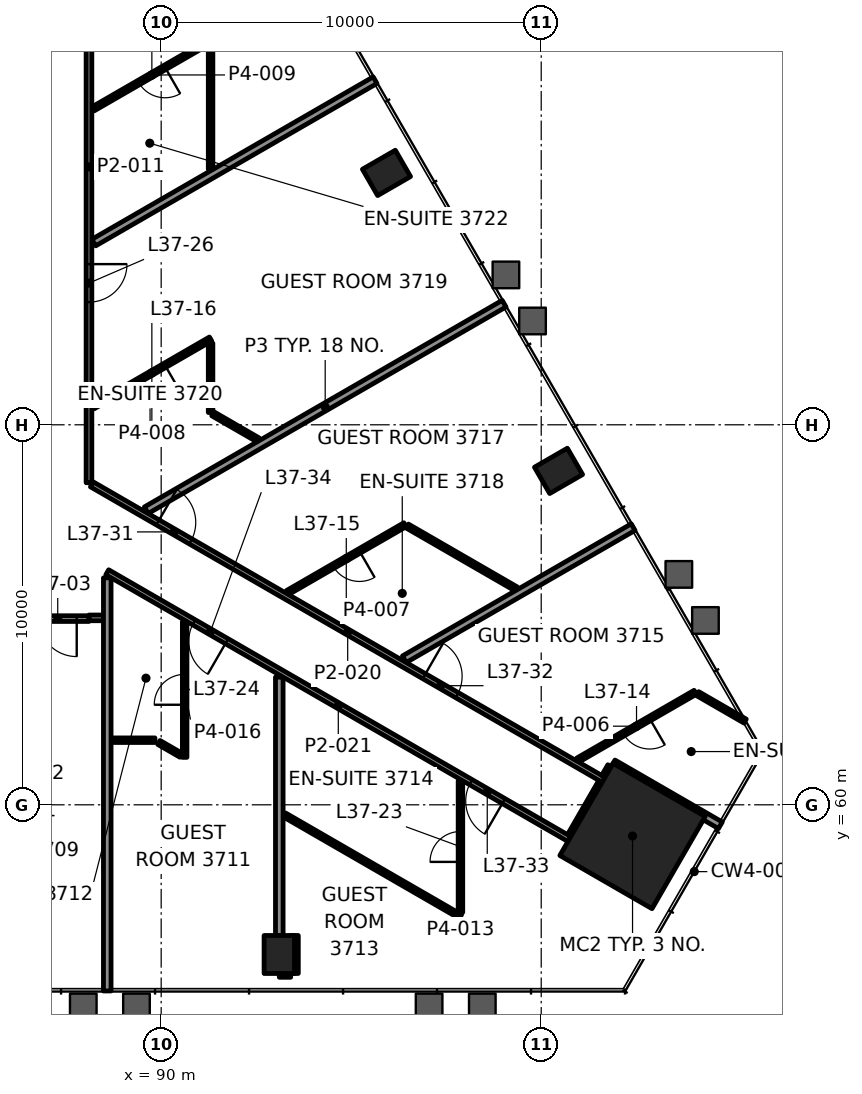
"""IFC4 building model, lengths in metres.
Left out: names, types, materials, properties, quantities, classifications, styles, units other than length and angle.
Written with IfcOpenShell. Run it as: python <this file> out.ifc"""

import sys

from ifc_helpers import new_model, si_unit, direction, frame, frame_2d, origin, origin_2d, place, context, subcontext, project, spatial, rectangle, hollow_rectangle, extrude, element, fill, save


model = new_model("IFC4")
c1 = context("Model", 3, precision=1e-05, world=origin(), true_north=direction((0.0, 1.0)))
c2 = subcontext(c1, "Body", "Model", "MODEL_VIEW")
j1 = project(units=[si_unit("LENGTHUNIT", "METRE"), si_unit("PLANEANGLEUNIT", "RADIAN")], contexts=[c1])
p1 = place(None, origin())
s1 = spatial("IfcSite", under=j1, at=p1, CompositionType="ELEMENT")
p2 = place(p1, origin())
s2 = spatial("IfcBuilding", under=s1, at=p2, CompositionType="ELEMENT")
p3 = place(p2, frame((0.0, 0.0, 163.6)))
s3 = spatial("IfcBuildingStorey", under=s2, at=p3, CompositionType="ELEMENT", Elevation=163.6)
p4 = place(p3, frame((102.403, 59.179, 0.0), z_axis=(0.0, 0.0, 1.0), x_axis=(0.5, 0.866025403784, 0.0)))
e1 = element("IfcColumn", 1, at=p4, inside=s3, PredefinedType="COLUMN", context=c2, shape_type="SweptSolid", body=[
    extrude(rectangle(XDim=2.8, YDim=2.8, at=origin_2d()), origin(), (0.0, 0.0, 1.0), 3.9),
])
for number, where, z_axis, x_axis in (
    (2, (93.108, 56.061, -0.0), (0.0, 0.0, 1.0), (1.0, 0.0, 0.0)),
    (3, (100.456, 68.788, -0.0), (0.0, 0.0, 1.0), (-0.5, 0.866, 0.0)),
    (4, (95.928, 76.628, -0.0), (0.0, 0.0, 1.0), (-0.5, 0.866, 0.0)),
):
    element("IfcColumn", number, at=place(p3, frame(where, z_axis=z_axis, x_axis=x_axis)), inside=s3, PredefinedType="COLUMN", context=c2, shape_type="SweptSolid", body=[
        extrude(hollow_rectangle(XDim=0.8, YDim=1.0, WallThickness=0.05, at=origin_2d()), origin(), (0.0, 0.0, 1.0), 3.9),
    ])
p5 = place(p3, frame((93.108, 55.561, 0.0), z_axis=(0.0, 0.0, 1.0), x_axis=(1.0, 0.0, 0.0)))
e5 = element("IfcWall", 5, at=p5, inside=s3, PredefinedType="PARTITIONING", context=c2, shape_type="SweptSolid", body=[
    extrude(rectangle(XDim=0.3, YDim=0.2, at=frame_2d((0.15, 0.0))), origin(), (0.0, 0.0, 1.0), 3.1),
])
p6 = place(p3, frame((88.691, 61.7, 0.0), z_axis=(0.0, 0.0, 1.0), x_axis=(1.0, 0.0, 0.0)))
e6 = element("IfcWall", 6, at=p6, inside=s3, PredefinedType="PARTITIONING", context=c2, shape_type="SweptSolid", body=[
    extrude(rectangle(XDim=1.145, YDim=0.12, at=frame_2d((0.573, 0.0))), origin(), (0.0, 0.0, 1.0), 3.1),
])
p7 = place(p3, frame((88.1, 64.9, 0.0), z_axis=(0.0, 0.0, 1.0), x_axis=(-1.0, 0.0, 0.0)))
e7 = element("IfcWall", 7, at=p7, inside=s3, PredefinedType="PARTITIONING", context=c2, shape_type="SweptSolid", body=[
    extrude(rectangle(XDim=26.199, YDim=0.15, at=frame_2d((13.1, 0.0))), origin(), (0.0, 0.0, 1.0), 3.1),
])
p8 = place(p7, frame((0.322, 0.0, 0.0)))
e8 = element("IfcOpeningElement", 8, at=p8, cuts=e7, PredefinedType="OPENING", context=c2, shape_type="SweptSolid", body=[
    extrude(rectangle(XDim=1.0, YDim=2.1, at=frame_2d((0.5, 1.05))), frame((0.0, 0.085, 0.0), z_axis=(0.0, -1.0, 0.0), x_axis=(1.0, 0.0, 0.0)), (0.0, 0.0, 1.0), 0.17),
])
p9 = place(p7, frame((5.859, 0.0, 0.0)))
e9 = element("IfcOpeningElement", 9, at=p9, cuts=e7, PredefinedType="OPENING", context=c2, shape_type="SweptSolid", body=[
    extrude(rectangle(XDim=0.9, YDim=2.1, at=frame_2d((0.45, 1.05))), frame((0.0, 0.085, 0.0), z_axis=(0.0, -1.0, 0.0), x_axis=(1.0, 0.0, 0.0)), (0.0, 0.0, 1.0), 0.17),
])
p10 = place(p7, frame((8.981, 0.0, 0.0)))
e10 = element("IfcOpeningElement", 10, at=p10, cuts=e7, PredefinedType="OPENING", context=c2, shape_type="SweptSolid", body=[
    extrude(rectangle(XDim=1.0, YDim=2.1, at=frame_2d((0.5, 1.05))), frame((0.0, 0.085, 0.0), z_axis=(0.0, -1.0, 0.0), x_axis=(1.0, 0.0, 0.0)), (0.0, 0.0, 1.0), 0.17),
])
p11 = place(p7, frame((16.611, 0.0, 0.0)))
e11 = element("IfcOpeningElement", 11, at=p11, cuts=e7, PredefinedType="OPENING", context=c2, shape_type="SweptSolid", body=[
    extrude(rectangle(XDim=0.9, YDim=2.1, at=frame_2d((0.45, 1.05))), frame((0.0, 0.085, 0.0), z_axis=(0.0, -1.0, 0.0), x_axis=(1.0, 0.0, 0.0)), (0.0, 0.0, 1.0), 0.17),
])
p12 = place(p7, frame((20.006, 0.0, 0.0)))
e12 = element("IfcOpeningElement", 12, at=p12, cuts=e7, PredefinedType="OPENING", context=c2, shape_type="SweptSolid", body=[
    extrude(rectangle(XDim=0.9, YDim=2.1, at=frame_2d((0.45, 1.05))), frame((0.0, 0.085, 0.0), z_axis=(0.0, -1.0, 0.0), x_axis=(1.0, 0.0, 0.0)), (0.0, 0.0, 1.0), 0.17),
])
p13 = place(p7, frame((23.575, 0.0, 0.0)))
e13 = element("IfcOpeningElement", 13, at=p13, cuts=e7, PredefinedType="OPENING", context=c2, shape_type="SweptSolid", body=[
    extrude(rectangle(XDim=1.0, YDim=2.1, at=frame_2d((0.5, 1.05))), frame((0.0, 0.085, 0.0), z_axis=(0.0, -1.0, 0.0), x_axis=(1.0, 0.0, 0.0)), (0.0, 0.0, 1.0), 0.17),
])
p14 = place(p3, frame((88.1, 64.919, 0.0), z_axis=(0.0, 0.0, 1.0), x_axis=(1.0, 0.0, 0.0)))
e14 = element("IfcWall", 14, at=p14, inside=s3, PredefinedType="PARTITIONING", context=c2, shape_type="SweptSolid", body=[
    extrude(rectangle(XDim=0.381, YDim=0.15, at=frame_2d((0.19, 0.0))), origin(), (0.0, 0.0, 1.0), 3.1),
])
p15 = place(p3, frame((104.053, 62.961, 0.0), z_axis=(0.0, 0.0, 1.0), x_axis=(-0.866045460162, -0.499965259726, 0.0)))
e15 = element("IfcWall", 15, at=p15, inside=s3, PredefinedType="PARTITIONING", context=c2, shape_type="SweptSolid", body=[
    extrude(rectangle(XDim=3.569, YDim=0.12, at=frame_2d((1.784, 0.0))), origin(), (0.0, 0.0, 1.0), 3.1),
])
p16 = place(p15, frame((1.384, 0.0, 0.0)))
e16 = element("IfcOpeningElement", 16, at=p16, cuts=e15, PredefinedType="OPENING", context=c2, shape_type="SweptSolid", body=[
    extrude(rectangle(XDim=0.8, YDim=2.1, at=frame_2d((0.4, 1.05))), frame((0.0, 0.07, 0.0), z_axis=(0.0, -1.0, 0.0), x_axis=(1.0, 0.0, 0.0)), (0.0, 0.0, 1.0), 0.14),
])
p17 = place(p3, frame((96.399, 63.831, 0.0), z_axis=(0.0, 0.0, 1.0), x_axis=(0.86602358327, 0.50000315321, 0.0)))
e17 = element("IfcWall", 17, at=p17, inside=s3, PredefinedType="PARTITIONING", context=c2, shape_type="SweptSolid", body=[
    extrude(rectangle(XDim=6.952, YDim=0.2, at=frame_2d((3.476, 0.0))), origin(), (0.0, 0.0, 1.0), 3.1),
])
p18 = place(p3, frame((96.416, 67.37, 0.0), z_axis=(0.0, 0.0, 1.0), x_axis=(-0.866028357664, -0.499994883695, 0.0)))
e18 = element("IfcWall", 18, at=p18, inside=s3, PredefinedType="PARTITIONING", context=c2, shape_type="SweptSolid", body=[
    extrude(rectangle(XDim=3.568, YDim=0.12, at=frame_2d((1.784, 0.0))), origin(), (0.0, 0.0, 1.0), 3.1),
])
p19 = place(p18, frame((1.384, 0.0, 0.0)))
e19 = element("IfcOpeningElement", 19, at=p19, cuts=e18, PredefinedType="OPENING", context=c2, shape_type="SweptSolid", body=[
    extrude(rectangle(XDim=0.8, YDim=2.1, at=frame_2d((0.4, 1.05))), frame((0.0, 0.07, 0.0), z_axis=(0.0, -1.0, 0.0), x_axis=(1.0, 0.0, 0.0)), (0.0, 0.0, 1.0), 0.14),
])
p20 = place(p3, frame((89.608, 67.752, 0.0), z_axis=(0.0, 0.0, 1.0), x_axis=(0.86602628359, 0.499998476129, 0.0)))
e20 = element("IfcWall", 20, at=p20, inside=s3, PredefinedType="PARTITIONING", context=c2, shape_type="SweptSolid", body=[
    extrude(rectangle(XDim=10.872, YDim=0.2, at=frame_2d((5.436, 0.0))), origin(), (0.0, 0.0, 1.0), 2.865),
])
p21 = place(p3, frame((91.3, 72.258, 0.0), z_axis=(0.0, 0.0, 1.0), x_axis=(-0.866028357664, -0.499994883695, 0.0)))
e21 = element("IfcWall", 21, at=p21, inside=s3, PredefinedType="PARTITIONING", context=c2, shape_type="SweptSolid", body=[
    extrude(rectangle(XDim=3.568, YDim=0.12, at=frame_2d((1.784, 0.0))), origin(), (0.0, 0.0, 1.0), 3.1),
])
p22 = place(p21, frame((1.384, 0.0, 0.0)))
e22 = element("IfcOpeningElement", 22, at=p22, cuts=e21, PredefinedType="OPENING", context=c2, shape_type="SweptSolid", body=[
    extrude(rectangle(XDim=0.8, YDim=2.1, at=frame_2d((0.4, 1.05))), frame((0.0, 0.07, 0.0), z_axis=(0.0, -1.0, 0.0), x_axis=(1.0, 0.0, 0.0)), (0.0, 0.0, 1.0), 0.14),
])
p23 = place(p3, frame((88.227, 74.795, 0.0), z_axis=(0.0, 0.0, 1.0), x_axis=(0.866017652766, 0.500013424917, 0.0)))
e23 = element("IfcWall", 23, at=p23, inside=s3, PredefinedType="PARTITIONING", context=c2, shape_type="SweptSolid", body=[
    extrude(rectangle(XDim=8.546, YDim=0.2, at=frame_2d((4.273, 0.0))), origin(), (0.0, 0.0, 1.0), 2.865),
])
p24 = place(p3, frame((91.3, 80.098, 0.0), z_axis=(0.0, 0.0, 1.0), x_axis=(-0.866028357664, -0.499994883695, 0.0)))
e24 = element("IfcWall", 24, at=p24, inside=s3, PredefinedType="PARTITIONING", context=c2, shape_type="SweptSolid", body=[
    extrude(rectangle(XDim=3.568, YDim=0.12, at=frame_2d((1.784, 0.0))), origin(), (0.0, 0.0, 1.0), 3.1),
])
p25 = place(p24, frame((1.384, 0.0, 0.0)))
e25 = element("IfcOpeningElement", 25, at=p25, cuts=e24, PredefinedType="OPENING", context=c2, shape_type="SweptSolid", body=[
    extrude(rectangle(XDim=0.8, YDim=2.1, at=frame_2d((0.4, 1.05))), frame((0.0, 0.07, 0.0), z_axis=(0.0, -1.0, 0.0), x_axis=(1.0, 0.0, 0.0)), (0.0, 0.0, 1.0), 0.14),
])
p26 = place(p3, frame((100.778, 59.165, 0.0), z_axis=(0.0, 0.0, 1.0), x_axis=(0.500102515474, 0.865966208357, 0.0)))
e26 = element("IfcWall", 26, at=p26, inside=s3, PredefinedType="PARTITIONING", context=c2, shape_type="SweptSolid", body=[
    extrude(rectangle(XDim=1.65, YDim=0.2, at=frame_2d((0.825, 0.0))), origin(), (0.0, 0.0, 1.0), 2.947),
])
p27 = place(p3, frame((97.875, 57.168, 0.0), z_axis=(0.0, 0.0, 1.0), x_axis=(0.0, 1.0, 0.0)))
e27 = element("IfcWall", 27, at=p27, inside=s3, PredefinedType="PARTITIONING", context=c2, shape_type="SweptSolid", body=[
    extrude(rectangle(XDim=3.459, YDim=0.12, at=frame_2d((1.729, 0.0))), origin(), (0.0, 0.0, 1.0), 3.1),
])
p28 = place(p27, frame((1.33, 0.0, 0.0)))
e28 = element("IfcOpeningElement", 28, at=p28, cuts=e27, PredefinedType="OPENING", context=c2, shape_type="SweptSolid", body=[
    extrude(rectangle(XDim=0.8, YDim=2.1, at=frame_2d((0.4, 1.05))), frame((0.0, 0.07, 0.0), z_axis=(0.0, -1.0, 0.0), x_axis=(1.0, 0.0, 0.0)), (0.0, 0.0, 1.0), 0.14),
])
p29 = place(p3, frame((93.508, 55.562, 0.0), z_axis=(0.0, 0.0, 1.0), x_axis=(0.0, 1.0, 0.0)))
e29 = element("IfcWall", 29, at=p29, inside=s3, PredefinedType="PARTITIONING", context=c2, shape_type="SweptSolid", body=[
    extrude(rectangle(XDim=0.999, YDim=0.2, at=frame_2d((0.5, 0.0))), origin(), (0.0, 0.0, 1.0), 3.1),
])
p30 = place(p3, frame((93.108, 56.561, 0.0), z_axis=(0.0, 0.0, 1.0), x_axis=(0.0, 1.0, 0.0)))
e30 = element("IfcWall", 30, at=p30, inside=s3, PredefinedType="PARTITIONING", context=c2, shape_type="SweptSolid", body=[
    extrude(rectangle(XDim=6.799, YDim=0.2, at=frame_2d((3.399, 0.0))), origin(), (0.0, 0.0, 1.0), 3.1),
])
p31 = place(p3, frame((91.3, 70.323, 0.0), z_axis=(0.0, 0.0, 1.0), x_axis=(0.0, 1.0, 0.0)))
e31 = element("IfcWall", 31, at=p31, inside=s3, PredefinedType="PARTITIONING", context=c2, shape_type="SweptSolid", body=[
    extrude(rectangle(XDim=1.824, YDim=0.12, at=frame_2d((0.912, 0.0))), origin(), (0.0, 0.0, 1.0), 3.1),
])
p32 = place(p3, frame((91.3, 76.725, 0.0), z_axis=(0.0, 0.0, 1.0), x_axis=(0.0, 1.0, 0.0)))
e32 = element("IfcWall", 32, at=p32, inside=s3, PredefinedType="PARTITIONING", context=c2, shape_type="SweptSolid", body=[
    extrude(rectangle(XDim=3.264, YDim=0.12, at=frame_2d((1.632, 0.0))), origin(), (0.0, 0.0, 1.0), 3.1),
])
p33 = place(p3, frame((90.618, 61.249, 0.0), z_axis=(0.0, 0.0, 1.0), x_axis=(0.0, 1.0, 0.0)))
e33 = element("IfcWall", 33, at=p33, inside=s3, PredefinedType="PARTITIONING", context=c2, shape_type="SweptSolid", body=[
    extrude(rectangle(XDim=3.569, YDim=0.12, at=frame_2d((1.784, 0.0))), origin(), (0.0, 0.0, 1.0), 2.947),
])
p34 = place(p33, frame((1.384, 0.0, 0.0)))
e34 = element("IfcOpeningElement", 34, at=p34, cuts=e33, PredefinedType="OPENING", context=c2, shape_type="SweptSolid", body=[
    extrude(rectangle(XDim=0.8, YDim=2.1, at=frame_2d((0.4, 1.05))), frame((0.0, 0.07, 0.0), z_axis=(0.0, -1.0, 0.0), x_axis=(1.0, 0.0, 0.0)), (0.0, 0.0, 1.0), 0.14),
])
p35 = place(p3, frame((88.581, 55.101, 0.0), z_axis=(0.0, 0.0, 1.0), x_axis=(0.0, 1.0, 0.0)))
e35 = element("IfcWall", 35, at=p35, inside=s3, PredefinedType="PARTITIONING", context=c2, shape_type="SweptSolid", body=[
    extrude(rectangle(XDim=10.872, YDim=0.2, at=frame_2d((5.436, 0.0))), origin(), (0.0, 0.0, 1.0), 2.865),
])
p36 = place(p3, frame((88.1, 85.1, 0.0), z_axis=(0.0, 0.0, 1.0), x_axis=(0.0, -1.0, 0.0)))
e36 = element("IfcWall", 36, at=p36, inside=s3, PredefinedType="PARTITIONING", context=c2, shape_type="SweptSolid", body=[
    extrude(rectangle(XDim=16.624, YDim=0.15, at=frame_2d((8.312, 0.0))), origin(), (0.0, 0.0, 1.0), 3.1),
])
p37 = place(p36, frame((3.031, 0.0, 0.0)))
e37 = element("IfcOpeningElement", 37, at=p37, cuts=e36, PredefinedType="OPENING", context=c2, shape_type="SweptSolid", body=[
    extrude(rectangle(XDim=1.0, YDim=2.1, at=frame_2d((0.5, 1.05))), frame((0.0, 0.085, 0.0), z_axis=(0.0, -1.0, 0.0), x_axis=(1.0, 0.0, 0.0)), (0.0, 0.0, 1.0), 0.17),
])
p38 = place(p36, frame((10.872, 0.0, 0.0)))
e38 = element("IfcOpeningElement", 38, at=p38, cuts=e36, PredefinedType="OPENING", context=c2, shape_type="SweptSolid", body=[
    extrude(rectangle(XDim=1.0, YDim=2.1, at=frame_2d((0.5, 1.05))), frame((0.0, 0.085, 0.0), z_axis=(0.0, -1.0, 0.0), x_axis=(1.0, 0.0, 0.0)), (0.0, 0.0, 1.0), 0.17),
])
p39 = place(p3, frame((105.366, 62.203, 0.0), z_axis=(0.0, 0.0, 1.0), x_axis=(-0.866011286779, 0.500024450573, 0.0)))
e39 = element("IfcWall", 39, at=p39, inside=s3, PredefinedType="PARTITIONING", context=c2, shape_type="SweptSolid", body=[
    extrude(rectangle(XDim=1.446, YDim=0.12, at=frame_2d((0.723, 0.0))), origin(), (0.0, 0.0, 1.0), 3.1),
])
p40 = place(p3, frame((99.337, 65.684, 0.0), z_axis=(0.0, 0.0, 1.0), x_axis=(-0.866024373554, 0.500001784407, 0.0)))
e40 = element("IfcWall", 40, at=p40, inside=s3, PredefinedType="PARTITIONING", context=c2, shape_type="SweptSolid", body=[
    extrude(rectangle(XDim=3.304, YDim=0.12, at=frame_2d((1.652, 0.0))), origin(), (0.0, 0.0, 1.0), 3.1),
])
p41 = place(p3, frame((92.546, 69.604, 0.0), z_axis=(0.0, 0.0, 1.0), x_axis=(-0.866052025982, 0.499953886166, 0.0)))
e41 = element("IfcWall", 41, at=p41, inside=s3, PredefinedType="PARTITIONING", context=c2, shape_type="SweptSolid", body=[
    extrude(rectangle(XDim=1.37, YDim=0.12, at=frame_2d((0.685, 0.0))), origin(), (0.0, 0.0, 1.0), 3.1),
])
p42 = place(p3, frame((104.714, 59.461, 0.0), z_axis=(0.0, 0.0, 1.0), x_axis=(-0.866035906198, 0.499981808845, 0.0)))
e42 = element("IfcWall", 42, at=p42, inside=s3, PredefinedType="PARTITIONING", context=c2, shape_type="SweptSolid", body=[
    extrude(rectangle(XDim=3.259, YDim=0.2, at=frame_2d((1.63, 0.0))), origin(), (0.0, 0.0, 1.0), 3.1),
])
p43 = place(p3, frame((88.175, 68.433, 0.0), z_axis=(0.0, 0.0, 1.0), x_axis=(0.866030530892, -0.499991119485, 0.0)))
e43 = element("IfcWall", 43, at=p43, inside=s3, PredefinedType="PARTITIONING", context=c2, shape_type="SweptSolid", body=[
    extrude(rectangle(XDim=15.549, YDim=0.15, at=frame_2d((7.774, 0.0))), origin(), (0.0, 0.0, 1.0), 3.1),
])
p44 = place(p43, frame((2.003, 0.0, 0.0)))
e44 = element("IfcOpeningElement", 44, at=p44, cuts=e43, PredefinedType="OPENING", context=c2, shape_type="SweptSolid", body=[
    extrude(rectangle(XDim=1.0, YDim=2.1, at=frame_2d((0.5, 1.05))), frame((0.0, 0.085, 0.0), z_axis=(0.0, -1.0, 0.0), x_axis=(1.0, 0.0, 0.0)), (0.0, 0.0, 1.0), 0.17),
])
p45 = place(p43, frame((10.096, 0.0, 0.0)))
e45 = element("IfcOpeningElement", 45, at=p45, cuts=e43, PredefinedType="OPENING", context=c2, shape_type="SweptSolid", body=[
    extrude(rectangle(XDim=1.0, YDim=2.1, at=frame_2d((0.5, 1.05))), frame((0.0, 0.085, 0.0), z_axis=(0.0, -1.0, 0.0), x_axis=(1.0, 0.0, 0.0)), (0.0, 0.0, 1.0), 0.17),
])
p46 = place(p3, frame((100.74, 59.1, 0.0), z_axis=(0.0, 0.0, 1.0), x_axis=(-0.866028060244, 0.499995398849, 0.0)))
e46 = element("IfcWall", 46, at=p46, inside=s3, PredefinedType="PARTITIONING", context=c2, shape_type="SweptSolid", body=[
    extrude(rectangle(XDim=14.04, YDim=0.15, at=frame_2d((7.02, 0.0))), origin(), (0.0, 0.0, 1.0), 2.947),
])
p47 = place(p46, frame((1.994, 0.0, 0.0)))
e47 = element("IfcOpeningElement", 47, at=p47, cuts=e46, PredefinedType="OPENING", context=c2, shape_type="SweptSolid", body=[
    extrude(rectangle(XDim=1.0, YDim=2.1, at=frame_2d((0.5, 1.05))), frame((0.0, 0.085, 0.0), z_axis=(0.0, -1.0, 0.0), x_axis=(1.0, 0.0, 0.0)), (0.0, 0.0, 1.0), 0.17),
])
p48 = place(p46, frame((10.409, 0.0, 0.0)))
e48 = element("IfcOpeningElement", 48, at=p48, cuts=e46, PredefinedType="OPENING", context=c2, shape_type="SweptSolid", body=[
    extrude(rectangle(XDim=1.0, YDim=2.1, at=frame_2d((0.5, 1.05))), frame((0.0, 0.085, 0.0), z_axis=(0.0, -1.0, 0.0), x_axis=(1.0, 0.0, 0.0)), (0.0, 0.0, 1.0), 0.17),
])
p49 = place(p3, frame((97.875, 57.059, 0.0), z_axis=(0.0, 0.0, 1.0), x_axis=(-0.866041187555, 0.499972660711, 0.0)))
e49 = element("IfcWall", 49, at=p49, inside=s3, PredefinedType="PARTITIONING", context=c2, shape_type="SweptSolid", body=[
    extrude(rectangle(XDim=5.349, YDim=0.12, at=frame_2d((2.675, 0.0))), origin(), (0.0, 0.0, 1.0), 3.1),
])
p50 = place(p3, frame((90.523, 61.303, 0.0), z_axis=(0.0, 0.0, 1.0), x_axis=(-0.865913915833, 0.500193053097, 0.0)))
e50 = element("IfcWall", 50, at=p50, inside=s3, PredefinedType="PARTITIONING", context=c2, shape_type="SweptSolid", body=[
    extrude(rectangle(XDim=0.674, YDim=0.12, at=frame_2d((0.337, 0.0))), origin(), (0.0, 0.0, 1.0), 3.1),
])
p51 = place(p3, frame((101.678, 60.723, 0.0), z_axis=(0.0, 0.0, 1.0), x_axis=(0.499700736801, 0.866198114545, 0.0)))
e51 = element("IfcWall", 51, at=p51, inside=s3, PredefinedType="PARTITIONING", context=c2, shape_type="SweptSolid", body=[
    extrude(rectangle(XDim=0.324, YDim=0.2, at=frame_2d((0.162, 0.0))), origin(), (0.0, 0.0, 1.0), 3.1),
])
p52 = place(p8, origin())
e52 = element("IfcDoor", 52, at=p52, inside=s3, OperationType="SINGLE_SWING_LEFT", PredefinedType="DOOR", context=c2, shape_type="SweptSolid", body=[
    extrude(rectangle(XDim=1.0, YDim=2.1, at=frame_2d((0.5, 1.05))), frame((0.0, 0.025, 0.0), z_axis=(0.0, -1.0, 0.0), x_axis=(1.0, 0.0, 0.0)), (0.0, 0.0, 1.0), 0.05),
])
fill(e8, e52)
p53 = place(p16, origin())
e53 = element("IfcDoor", 53, at=p53, inside=s3, OperationType="SINGLE_SWING_RIGHT", PredefinedType="DOOR", context=c2, shape_type="SweptSolid", body=[
    extrude(rectangle(XDim=0.8, YDim=2.1, at=frame_2d((0.4, 1.05))), frame((0.0, 0.025, 0.0), z_axis=(0.0, -1.0, 0.0), x_axis=(1.0, 0.0, 0.0)), (0.0, 0.0, 1.0), 0.05),
])
fill(e16, e53)
p54 = place(p19, origin())
e54 = element("IfcDoor", 54, at=p54, inside=s3, OperationType="SINGLE_SWING_RIGHT", PredefinedType="DOOR", context=c2, shape_type="SweptSolid", body=[
    extrude(rectangle(XDim=0.8, YDim=2.1, at=frame_2d((0.4, 1.05))), frame((0.0, 0.025, 0.0), z_axis=(0.0, -1.0, 0.0), x_axis=(1.0, 0.0, 0.0)), (0.0, 0.0, 1.0), 0.05),
])
fill(e19, e54)
p55 = place(p22, origin())
e55 = element("IfcDoor", 55, at=p55, inside=s3, OperationType="SINGLE_SWING_RIGHT", PredefinedType="DOOR", context=c2, shape_type="SweptSolid", body=[
    extrude(rectangle(XDim=0.8, YDim=2.1, at=frame_2d((0.4, 1.05))), frame((0.0, 0.025, 0.0), z_axis=(0.0, -1.0, 0.0), x_axis=(1.0, 0.0, 0.0)), (0.0, 0.0, 1.0), 0.05),
])
fill(e22, e55)
p56 = place(p25, origin())
e56 = element("IfcDoor", 56, at=p56, inside=s3, OperationType="SINGLE_SWING_RIGHT", PredefinedType="DOOR", context=c2, shape_type="SweptSolid", body=[
    extrude(rectangle(XDim=0.8, YDim=2.1, at=frame_2d((0.4, 1.05))), frame((0.0, 0.025, 0.0), z_axis=(0.0, -1.0, 0.0), x_axis=(1.0, 0.0, 0.0)), (0.0, 0.0, 1.0), 0.05),
])
fill(e25, e56)
p57 = place(p28, origin())
e57 = element("IfcDoor", 57, at=p57, inside=s3, OperationType="SINGLE_SWING_LEFT", PredefinedType="DOOR", context=c2, shape_type="SweptSolid", body=[
    extrude(rectangle(XDim=0.8, YDim=2.1, at=frame_2d((0.4, 1.05))), frame((0.0, 0.025, 0.0), z_axis=(0.0, -1.0, 0.0), x_axis=(1.0, 0.0, 0.0)), (0.0, 0.0, 1.0), 0.05),
])
fill(e28, e57)
p58 = place(p34, origin())
e58 = element("IfcDoor", 58, at=p58, inside=s3, OperationType="SINGLE_SWING_LEFT", PredefinedType="DOOR", context=c2, shape_type="SweptSolid", body=[
    extrude(rectangle(XDim=0.8, YDim=2.1, at=frame_2d((0.4, 1.05))), frame((0.0, 0.025, 0.0), z_axis=(0.0, -1.0, 0.0), x_axis=(1.0, 0.0, 0.0)), (0.0, 0.0, 1.0), 0.05),
])
fill(e34, e58)
p59 = place(p38, origin())
e59 = element("IfcDoor", 59, at=p59, inside=s3, OperationType="SINGLE_SWING_LEFT", PredefinedType="DOOR", context=c2, shape_type="SweptSolid", body=[
    extrude(rectangle(XDim=1.0, YDim=2.1, at=frame_2d((0.5, 1.05))), frame((0.0, 0.025, 0.0), z_axis=(0.0, -1.0, 0.0), x_axis=(1.0, 0.0, 0.0)), (0.0, 0.0, 1.0), 0.05),
])
fill(e38, e59)
p60 = place(p44, origin())
e60 = element("IfcDoor", 60, at=p60, inside=s3, OperationType="SINGLE_SWING_LEFT", PredefinedType="DOOR", context=c2, shape_type="SweptSolid", body=[
    extrude(rectangle(XDim=1.0, YDim=2.1, at=frame_2d((0.5, 1.05))), frame((0.0, 0.025, 0.0), z_axis=(0.0, -1.0, 0.0), x_axis=(1.0, 0.0, 0.0)), (0.0, 0.0, 1.0), 0.05),
])
fill(e44, e60)
p61 = place(p45, origin())
e61 = element("IfcDoor", 61, at=p61, inside=s3, OperationType="SINGLE_SWING_LEFT", PredefinedType="DOOR", context=c2, shape_type="SweptSolid", body=[
    extrude(rectangle(XDim=1.0, YDim=2.1, at=frame_2d((0.5, 1.05))), frame((0.0, 0.025, 0.0), z_axis=(0.0, -1.0, 0.0), x_axis=(1.0, 0.0, 0.0)), (0.0, 0.0, 1.0), 0.05),
])
fill(e45, e61)
p62 = place(p47, origin())
e62 = element("IfcDoor", 62, at=p62, inside=s3, OperationType="SINGLE_SWING_RIGHT", PredefinedType="DOOR", context=c2, shape_type="SweptSolid", body=[
    extrude(rectangle(XDim=1.0, YDim=2.1, at=frame_2d((0.5, 1.05))), frame((0.0, 0.025, 0.0), z_axis=(0.0, -1.0, 0.0), x_axis=(1.0, 0.0, 0.0)), (0.0, 0.0, 1.0), 0.05),
])
fill(e47, e62)
p63 = place(p48, origin())
e63 = element("IfcDoor", 63, at=p63, inside=s3, OperationType="SINGLE_SWING_RIGHT", PredefinedType="DOOR", context=c2, shape_type="SweptSolid", body=[
    extrude(rectangle(XDim=1.0, YDim=2.1, at=frame_2d((0.5, 1.05))), frame((0.0, 0.025, 0.0), z_axis=(0.0, -1.0, 0.0), x_axis=(1.0, 0.0, 0.0)), (0.0, 0.0, 1.0), 0.05),
])
fill(e48, e63)
save(model, sys.argv[1])
